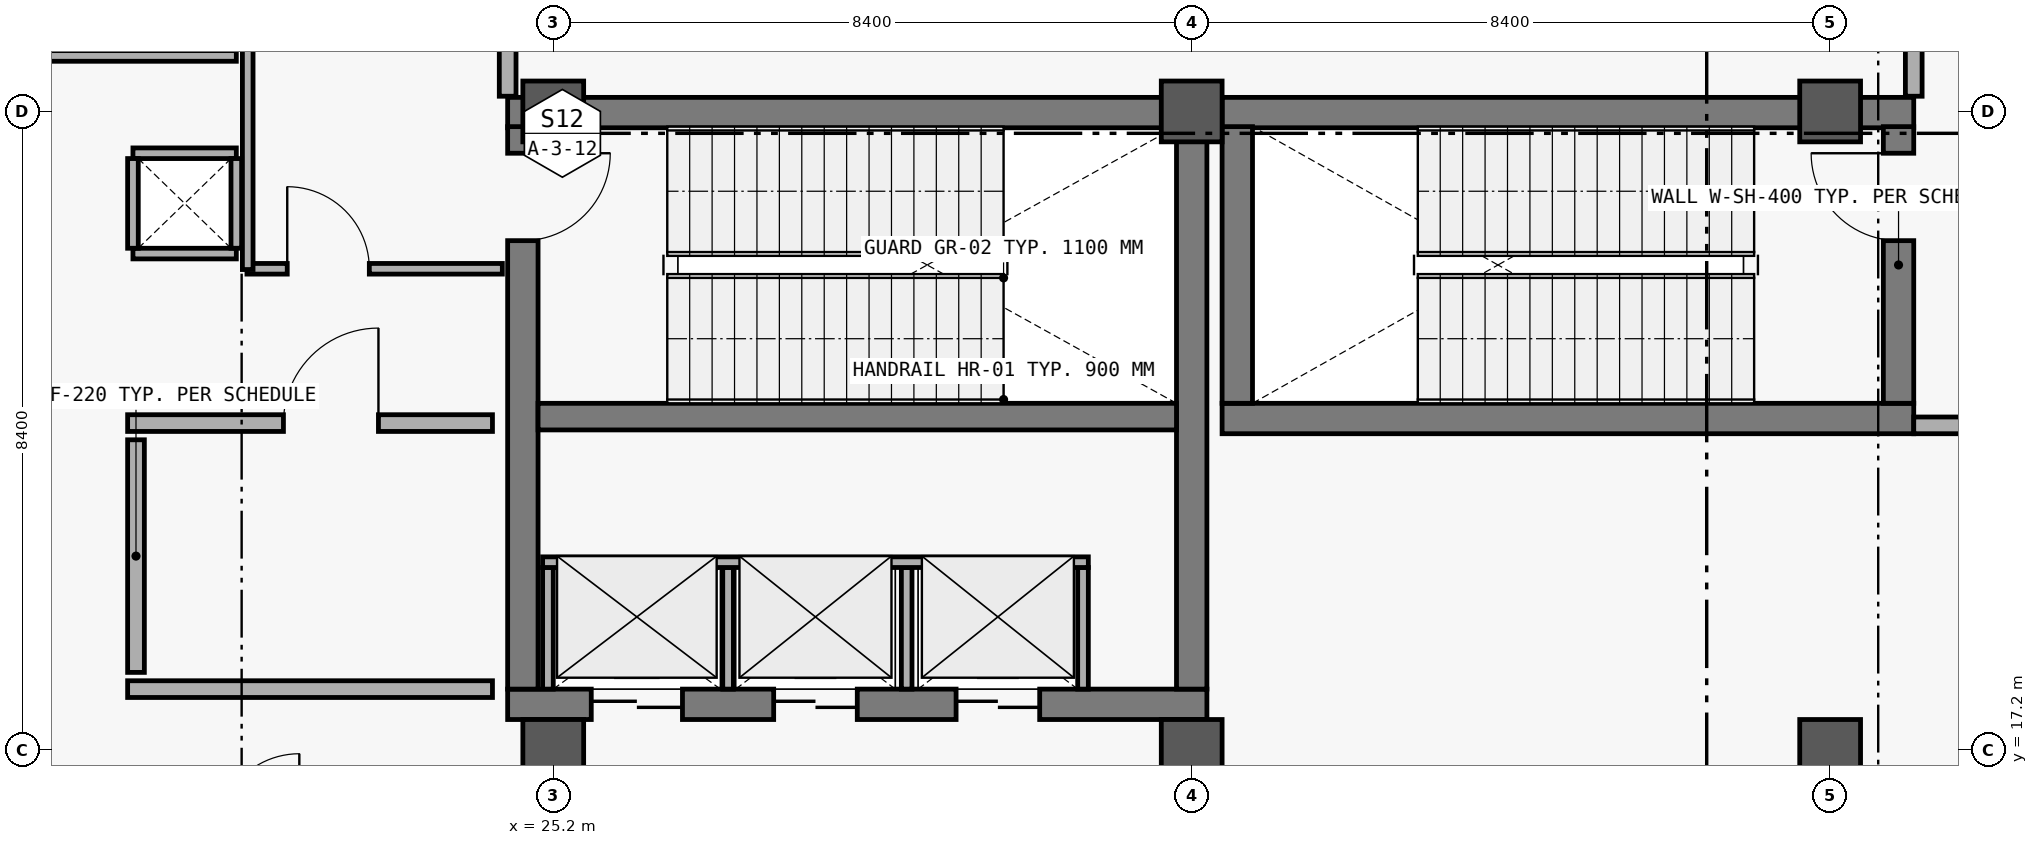
"""IFC4 building model, lengths in metres.
Left out: names, types, materials, properties, quantities, classifications, styles, units other than length and angle.
Written with IfcOpenShell. Run it as: python <this file> out.ifc"""

import sys

from ifc_helpers import new_model, si_unit, direction, frame, frame_2d, origin, origin_2d, place, context, subcontext, project, spatial, rectangle, extrude, element, fill, save


model = new_model("IFC4")
c1 = context("Model", 3, precision=1e-05, world=origin(), true_north=direction((0.0, 1.0)))
c2 = subcontext(c1, "Body", "Model", "MODEL_VIEW")
j1 = project(units=[si_unit("LENGTHUNIT", "METRE"), si_unit("PLANEANGLEUNIT", "RADIAN")], contexts=[c1])
p1 = place(None, origin())
s1 = spatial("IfcSite", under=j1, at=p1, CompositionType="ELEMENT")
p2 = place(p1, origin())
s2 = spatial("IfcBuilding", under=s1, at=p2, CompositionType="ELEMENT")
p3 = place(p2, origin())
s3 = spatial("IfcBuildingStorey", under=s2, at=p3, CompositionType="ELEMENT", Elevation=0.0)
for number, where, z_axis, x_axis in (
    (1, (25.2, 17.2, 0.0), (0.0, 0.0, 1.0), (1.0, 0.0, 0.0)),
    (2, (25.2, 25.6, 0.0), (0.0, 0.0, 1.0), (1.0, 0.0, 0.0)),
    (3, (33.6, 17.2, 0.0), (0.0, 0.0, 1.0), (1.0, 0.0, 0.0)),
    (4, (33.6, 25.6, 0.0), (0.0, 0.0, 1.0), (1.0, 0.0, 0.0)),
    (5, (42.0, 17.2, 0.0), (0.0, 0.0, 1.0), (1.0, 0.0, 0.0)),
    (6, (42.0, 25.6, 0.0), (0.0, 0.0, 1.0), (1.0, 0.0, 0.0)),
):
    element("IfcColumn", number, at=place(p3, frame(where, z_axis=z_axis, x_axis=x_axis)), inside=s3, PredefinedType="COLUMN", context=c2, shape_type="SweptSolid", body=[
        extrude(rectangle(XDim=0.8, YDim=0.8, at=origin_2d()), origin(), (0.0, 0.0, 1.0), 5.4),
    ])
p4 = place(p3, frame((24.6, 17.8, 0.0), z_axis=(0.0, 0.0, 1.0), x_axis=(1.0, 0.0, 0.0)))
e7 = element("IfcWall", 7, at=p4, inside=s3, PredefinedType="SHEAR", context=c2, shape_type="SweptSolid", body=[
    extrude(rectangle(XDim=9.2, YDim=0.4, at=frame_2d((4.6, 0.0))), origin(), (0.0, 0.0, 1.0), 5.08),
])
p5 = place(p4, frame((1.1, 0.0, 0.0)))
e8 = element("IfcOpeningElement", 8, at=p5, cuts=e7, PredefinedType="OPENING", context=c2, shape_type="SweptSolid", body=[
    extrude(rectangle(XDim=1.2, YDim=2.2, at=frame_2d((0.6, 1.1))), frame((0.0, 0.21, 0.0), z_axis=(0.0, -1.0, 0.0), x_axis=(1.0, 0.0, 0.0)), (0.0, 0.0, 1.0), 0.42),
])
p6 = place(p4, frame((3.5, 0.0, 0.0)))
e9 = element("IfcOpeningElement", 9, at=p6, cuts=e7, PredefinedType="OPENING", context=c2, shape_type="SweptSolid", body=[
    extrude(rectangle(XDim=1.1, YDim=2.2, at=frame_2d((0.55, 1.1))), frame((0.0, 0.21, 0.0), z_axis=(0.0, -1.0, 0.0), x_axis=(1.0, 0.0, 0.0)), (0.0, 0.0, 1.0), 0.42),
])
p7 = place(p4, frame((5.9, 0.0, 0.0)))
e10 = element("IfcOpeningElement", 10, at=p7, cuts=e7, PredefinedType="OPENING", context=c2, shape_type="SweptSolid", body=[
    extrude(rectangle(XDim=1.1, YDim=2.2, at=frame_2d((0.55, 1.1))), frame((0.0, 0.21, 0.0), z_axis=(0.0, -1.0, 0.0), x_axis=(1.0, 0.0, 0.0)), (0.0, 0.0, 1.0), 0.42),
])
p8 = place(p3, frame((33.8, 25.585, 0.0), z_axis=(0.0, 0.0, 1.0), x_axis=(-1.0, 0.0, 0.0)))
e11 = element("IfcWall", 11, at=p8, inside=s3, PredefinedType="SHEAR", context=c2, shape_type="SweptSolid", body=[
    extrude(rectangle(XDim=9.2, YDim=0.4, at=frame_2d((4.6, 0.0))), origin(), (0.0, 0.0, 1.0), 5.08),
])
p9 = place(p3, frame((24.8, 25.4, 0.0), z_axis=(0.0, 0.0, 1.0), x_axis=(0.0, -1.0, 0.0)))
e12 = element("IfcWall", 12, at=p9, inside=s3, PredefinedType="SHEAR", context=c2, shape_type="SweptSolid", body=[
    extrude(rectangle(XDim=7.4, YDim=0.4, at=frame_2d((3.7, 0.0))), origin(), (0.0, 0.0, 1.0), 5.08),
])
p10 = place(p9, frame((0.35, 0.0, 0.0)))
e13 = element("IfcOpeningElement", 13, at=p10, cuts=e12, PredefinedType="OPENING", context=c2, shape_type="SweptSolid", body=[
    extrude(rectangle(XDim=1.15, YDim=2.2, at=frame_2d((0.575, 1.1))), frame((0.0, 0.21, 0.0), z_axis=(0.0, -1.0, 0.0), x_axis=(1.0, 0.0, 0.0)), (0.0, 0.0, 1.0), 0.42),
])
p11 = place(p3, frame((33.6, 18.0, 0.0), z_axis=(0.0, 0.0, 1.0), x_axis=(0.0, 1.0, 0.0)))
e14 = element("IfcWall", 14, at=p11, inside=s3, PredefinedType="SHEAR", context=c2, shape_type="SweptSolid", body=[
    extrude(rectangle(XDim=7.4, YDim=0.4, at=frame_2d((3.7, 0.0))), origin(), (0.0, 0.0, 1.0), 5.08),
])
p12 = place(p3, frame((25.0, 21.585, 0.0), z_axis=(0.0, 0.0, 1.0), x_axis=(1.0, 0.0, 0.0)))
e15 = element("IfcWall", 15, at=p12, inside=s3, PredefinedType="SHEAR", context=c2, shape_type="SweptSolid", body=[
    extrude(rectangle(XDim=8.4, YDim=0.35, at=frame_2d((4.2, 0.0))), origin(), (0.0, 0.0, 1.0), 5.08),
])
for number, where, z_axis, x_axis in (
    (16, (25.13, 18.0, 0.0), (0.0, 0.0, 1.0), (0.0, 1.0, 0.0)),
    (17, (27.5, 18.0, 0.0), (0.0, 0.0, 1.0), (0.0, 1.0, 0.0)),
    (18, (29.85, 18.0, 0.0), (0.0, 0.0, 1.0), (0.0, 1.0, 0.0)),
    (19, (32.17, 18.0, 0.0), (0.0, 0.0, 1.0), (0.0, 1.0, 0.0)),
):
    element("IfcWall", number, at=place(p3, frame(where, z_axis=z_axis, x_axis=x_axis)), inside=s3, PredefinedType="PARTITIONING", context=c2, shape_type="SweptSolid", body=[
        extrude(rectangle(XDim=1.6, YDim=0.14, at=frame_2d((0.8, 0.0))), origin(), (0.0, 0.0, 1.0), 4.23),
    ])
p13 = place(p3, frame((25.06, 19.67, 0.0), z_axis=(0.0, 0.0, 1.0), x_axis=(1.0, 0.0, 0.0)))
e20 = element("IfcWall", 20, at=p13, inside=s3, PredefinedType="PARTITIONING", context=c2, shape_type="SweptSolid", body=[
    extrude(rectangle(XDim=7.18, YDim=0.14, at=frame_2d((3.59, 0.0))), origin(), (0.0, 0.0, 1.0), 4.23),
])
p14 = place(p3, frame((19.6, 18.0, 0.0), z_axis=(0.0, 0.0, 1.0), x_axis=(1.0, 0.0, 0.0)))
e21 = element("IfcWall", 21, at=p14, inside=s3, PredefinedType="SOLIDWALL", context=c2, shape_type="SweptSolid", body=[
    extrude(rectangle(XDim=4.8, YDim=0.22, at=frame_2d((2.4, 0.0))), origin(), (0.0, 0.0, 1.0), 4.23),
])
p15 = place(p3, frame((19.6, 21.5, 0.0), z_axis=(0.0, 0.0, 1.0), x_axis=(1.0, 0.0, 0.0)))
e22 = element("IfcWall", 22, at=p15, inside=s3, PredefinedType="SOLIDWALL", context=c2, shape_type="SweptSolid", body=[
    extrude(rectangle(XDim=4.8, YDim=0.22, at=frame_2d((2.4, 0.0))), origin(), (0.0, 0.0, 1.0), 4.23),
])
p16 = place(p15, frame((2.05, 0.0, 0.0)))
e23 = element("IfcOpeningElement", 23, at=p16, cuts=e22, PredefinedType="OPENING", context=c2, shape_type="SweptSolid", body=[
    extrude(rectangle(XDim=1.25, YDim=2.2, at=frame_2d((0.625, 1.1))), frame((0.0, 0.12, 0.0), z_axis=(0.0, -1.0, 0.0), x_axis=(1.0, 0.0, 0.0)), (0.0, 0.0, 1.0), 0.24),
])
p17 = place(p3, frame((19.71, 18.22, 0.0), z_axis=(0.0, 0.0, 1.0), x_axis=(0.0, 1.0, 0.0)))
e24 = element("IfcWall", 24, at=p17, inside=s3, PredefinedType="SOLIDWALL", context=c2, shape_type="SweptSolid", body=[
    extrude(rectangle(XDim=3.06, YDim=0.22, at=frame_2d((1.53, 0.0))), origin(), (0.0, 0.0, 1.0), 4.23),
])
for number, where, z_axis, x_axis in (
    (25, (34.0, 21.56, 0.0), (0.0, 0.0, 1.0), (1.0, 0.0, 0.0)),
    (26, (43.1, 25.585, 0.0), (0.0, 0.0, 1.0), (-1.0, 0.0, 0.0)),
):
    element("IfcWall", number, at=place(p3, frame(where, z_axis=z_axis, x_axis=x_axis)), inside=s3, PredefinedType="SHEAR", context=c2, shape_type="SweptSolid", body=[
        extrude(rectangle(XDim=9.1, YDim=0.4, at=frame_2d((4.55, 0.0))), origin(), (0.0, 0.0, 1.0), 5.08),
    ])
p18 = place(p3, frame((34.2, 25.4, 0.0), z_axis=(0.0, 0.0, 1.0), x_axis=(0.0, -1.0, 0.0)))
e27 = element("IfcWall", 27, at=p18, inside=s3, PredefinedType="SHEAR", context=c2, shape_type="SweptSolid", body=[
    extrude(rectangle(XDim=3.64, YDim=0.4, at=frame_2d((1.82, 0.0))), origin(), (0.0, 0.0, 1.0), 5.08),
])
p19 = place(p3, frame((42.9, 21.76, 0.0), z_axis=(0.0, 0.0, 1.0), x_axis=(0.0, 1.0, 0.0)))
e28 = element("IfcWall", 28, at=p19, inside=s3, PredefinedType="SHEAR", context=c2, shape_type="SweptSolid", body=[
    extrude(rectangle(XDim=3.64, YDim=0.4, at=frame_2d((1.82, 0.0))), origin(), (0.0, 0.0, 1.0), 5.08),
])
p20 = place(p19, frame((2.14, 0.0, 0.0)))
e29 = element("IfcOpeningElement", 29, at=p20, cuts=e28, PredefinedType="OPENING", context=c2, shape_type="SweptSolid", body=[
    extrude(rectangle(XDim=1.15, YDim=2.2, at=frame_2d((0.575, 1.1))), frame((0.0, 0.21, 0.0), z_axis=(0.0, -1.0, 0.0), x_axis=(1.0, 0.0, 0.0)), (0.0, 0.0, 1.0), 0.42),
])
p21 = place(p3, frame((21.17, 23.53, 0.0), z_axis=(0.0, 0.0, 1.0), x_axis=(1.0, 0.0, 0.0)))
e30 = element("IfcWall", 30, at=p21, inside=s3, PredefinedType="PARTITIONING", context=c2, shape_type="SweptSolid", body=[
    extrude(rectangle(XDim=3.36, YDim=0.14, at=frame_2d((1.68, 0.0))), origin(), (0.0, 0.0, 1.0), 4.18),
])
p22 = place(p21, frame((0.53, 0.0, 0.0)))
e31 = element("IfcOpeningElement", 31, at=p22, cuts=e30, PredefinedType="OPENING", context=c2, shape_type="SweptSolid", body=[
    extrude(rectangle(XDim=1.08, YDim=2.25, at=frame_2d((0.54, 1.125))), frame((0.0, 0.08, 0.0), z_axis=(0.0, -1.0, 0.0), x_axis=(1.0, 0.0, 0.0)), (0.0, 0.0, 1.0), 0.16),
])
p23 = place(p3, frame((8.74, 26.33, 0.0), z_axis=(0.0, 0.0, 1.0), x_axis=(1.0, 0.0, 0.0)))
e32 = element("IfcWall", 32, at=p23, inside=s3, PredefinedType="PARTITIONING", context=c2, shape_type="SweptSolid", body=[
    extrude(rectangle(XDim=12.29, YDim=0.14, at=frame_2d((6.145, 0.0))), origin(), (0.0, 0.0, 1.0), 4.18),
])
p24 = place(p23, frame((3.947, 0.0, 0.0)))
e33 = element("IfcOpeningElement", 33, at=p24, cuts=e32, PredefinedType="OPENING", context=c2, shape_type="SweptSolid", body=[
    extrude(rectangle(XDim=1.08, YDim=2.25, at=frame_2d((0.54, 1.125))), frame((0.0, 0.08, 0.0), z_axis=(0.0, -1.0, 0.0), x_axis=(1.0, 0.0, 0.0)), (0.0, 0.0, 1.0), 0.16),
])
p25 = place(p3, frame((21.18, 23.52, 0.0), z_axis=(0.0, 0.0, 1.0), x_axis=(0.0, 1.0, 0.0)))
e34 = element("IfcWall", 34, at=p25, inside=s3, PredefinedType="PARTITIONING", context=c2, shape_type="SweptSolid", body=[
    extrude(rectangle(XDim=10.14, YDim=0.14, at=frame_2d((5.07, 0.0))), origin(), (0.0, 0.0, 1.0), 4.18),
])
for number, where, z_axis, x_axis in (
    (35, (19.67, 23.73, 0.0), (0.0, 0.0, 1.0), (1.0, 0.0, 0.0)),
    (36, (21.03, 25.05, 0.0), (0.0, 0.0, 1.0), (-1.0, 0.0, 0.0)),
):
    element("IfcWall", number, at=place(p3, frame(where, z_axis=z_axis, x_axis=x_axis)), inside=s3, PredefinedType="PARTITIONING", context=c2, shape_type="SweptSolid", body=[
        extrude(rectangle(XDim=1.36, YDim=0.14, at=frame_2d((0.68, 0.0))), origin(), (0.0, 0.0, 1.0), 4.2),
    ])
for number, where, z_axis, x_axis in (
    (37, (19.67, 24.98, 0.0), (0.0, 0.0, 1.0), (0.0, -1.0, 0.0)),
    (38, (21.03, 23.8, 0.0), (0.0, 0.0, 1.0), (0.0, 1.0, 0.0)),
):
    element("IfcWall", number, at=place(p3, frame(where, z_axis=z_axis, x_axis=x_axis)), inside=s3, PredefinedType="PARTITIONING", context=c2, shape_type="SweptSolid", body=[
        extrude(rectangle(XDim=1.18, YDim=0.14, at=frame_2d((0.59, 0.0))), origin(), (0.0, 0.0, 1.0), 4.2),
    ])
for number, where, z_axis, x_axis in (
    (39, (24.6, 25.8, 0.0), (0.0, 0.0, 1.0), (0.0, 1.0, 0.0)),
    (40, (43.1, 25.8, 0.0), (0.0, 0.0, 1.0), (0.0, 1.0, 0.0)),
):
    element("IfcWall", number, at=place(p3, frame(where, z_axis=z_axis, x_axis=x_axis)), inside=s3, PredefinedType="SOLIDWALL", context=c2, shape_type="SweptSolid", body=[
        extrude(rectangle(XDim=7.86, YDim=0.22, at=frame_2d((3.93, 0.0))), origin(), (0.0, 0.0, 1.0), 4.2),
    ])
p26 = place(p3, frame((43.1, 21.47, 0.0), z_axis=(0.0, 0.0, 1.0), x_axis=(1.0, 0.0, 0.0)))
e41 = element("IfcWall", 41, at=p26, inside=s3, PredefinedType="SOLIDWALL", context=c2, shape_type="SweptSolid", body=[
    extrude(rectangle(XDim=4.9, YDim=0.22, at=frame_2d((2.45, 0.0))), origin(), (0.0, 0.0, 1.0), 4.2),
])
p27 = place(p10, origin())
e42 = element("IfcDoor", 42, at=p27, inside=s3, OperationType="SINGLE_SWING_LEFT", PredefinedType="DOOR", context=c2, shape_type="SweptSolid", body=[
    extrude(rectangle(XDim=1.15, YDim=2.2, at=frame_2d((0.575, 1.1))), frame((0.0, 0.025, 0.0), z_axis=(0.0, -1.0, 0.0), x_axis=(1.0, 0.0, 0.0)), (0.0, 0.0, 1.0), 0.05),
])
fill(e13, e42)
p28 = place(p5, origin())
e43 = element("IfcDoor", 43, at=p28, inside=s3, OperationType="DOUBLE_DOOR_SLIDING", PredefinedType="DOOR", context=c2, shape_type="SweptSolid", body=[
    extrude(rectangle(XDim=1.2, YDim=2.2, at=frame_2d((0.6, 1.1))), frame((0.0, 0.025, 0.0), z_axis=(0.0, -1.0, 0.0), x_axis=(1.0, 0.0, 0.0)), (0.0, 0.0, 1.0), 0.05),
])
fill(e8, e43)
p29 = place(p6, origin())
e44 = element("IfcDoor", 44, at=p29, inside=s3, OperationType="DOUBLE_DOOR_SLIDING", PredefinedType="DOOR", context=c2, shape_type="SweptSolid", body=[
    extrude(rectangle(XDim=1.1, YDim=2.2, at=frame_2d((0.55, 1.1))), frame((0.0, 0.025, 0.0), z_axis=(0.0, -1.0, 0.0), x_axis=(1.0, 0.0, 0.0)), (0.0, 0.0, 1.0), 0.05),
])
fill(e9, e44)
p30 = place(p7, origin())
e45 = element("IfcDoor", 45, at=p30, inside=s3, OperationType="DOUBLE_DOOR_SLIDING", PredefinedType="DOOR", context=c2, shape_type="SweptSolid", body=[
    extrude(rectangle(XDim=1.1, YDim=2.2, at=frame_2d((0.55, 1.1))), frame((0.0, 0.025, 0.0), z_axis=(0.0, -1.0, 0.0), x_axis=(1.0, 0.0, 0.0)), (0.0, 0.0, 1.0), 0.05),
])
fill(e10, e45)
p31 = place(p16, origin())
e46 = element("IfcDoor", 46, at=p31, inside=s3, OperationType="SINGLE_SWING_RIGHT", PredefinedType="DOOR", context=c2, shape_type="SweptSolid", body=[
    extrude(rectangle(XDim=1.25, YDim=2.2, at=frame_2d((0.625, 1.1))), frame((0.0, 0.025, 0.0), z_axis=(0.0, -1.0, 0.0), x_axis=(1.0, 0.0, 0.0)), (0.0, 0.0, 1.0), 0.05),
])
fill(e23, e46)
p32 = place(p20, origin())
e47 = element("IfcDoor", 47, at=p32, inside=s3, OperationType="SINGLE_SWING_RIGHT", PredefinedType="DOOR", context=c2, shape_type="SweptSolid", body=[
    extrude(rectangle(XDim=1.15, YDim=2.2, at=frame_2d((0.575, 1.1))), frame((0.0, 0.025, 0.0), z_axis=(0.0, -1.0, 0.0), x_axis=(1.0, 0.0, 0.0)), (0.0, 0.0, 1.0), 0.05),
])
fill(e29, e47)
p33 = place(p22, origin())
e48 = element("IfcDoor", 48, at=p33, inside=s3, OperationType="SINGLE_SWING_LEFT", PredefinedType="DOOR", context=c2, shape_type="SweptSolid", body=[
    extrude(rectangle(XDim=1.08, YDim=2.25, at=frame_2d((0.54, 1.125))), frame((0.0, 0.025, 0.0), z_axis=(0.0, -1.0, 0.0), x_axis=(1.0, 0.0, 0.0)), (0.0, 0.0, 1.0), 0.05),
])
fill(e31, e48)
save(model, sys.argv[1])
